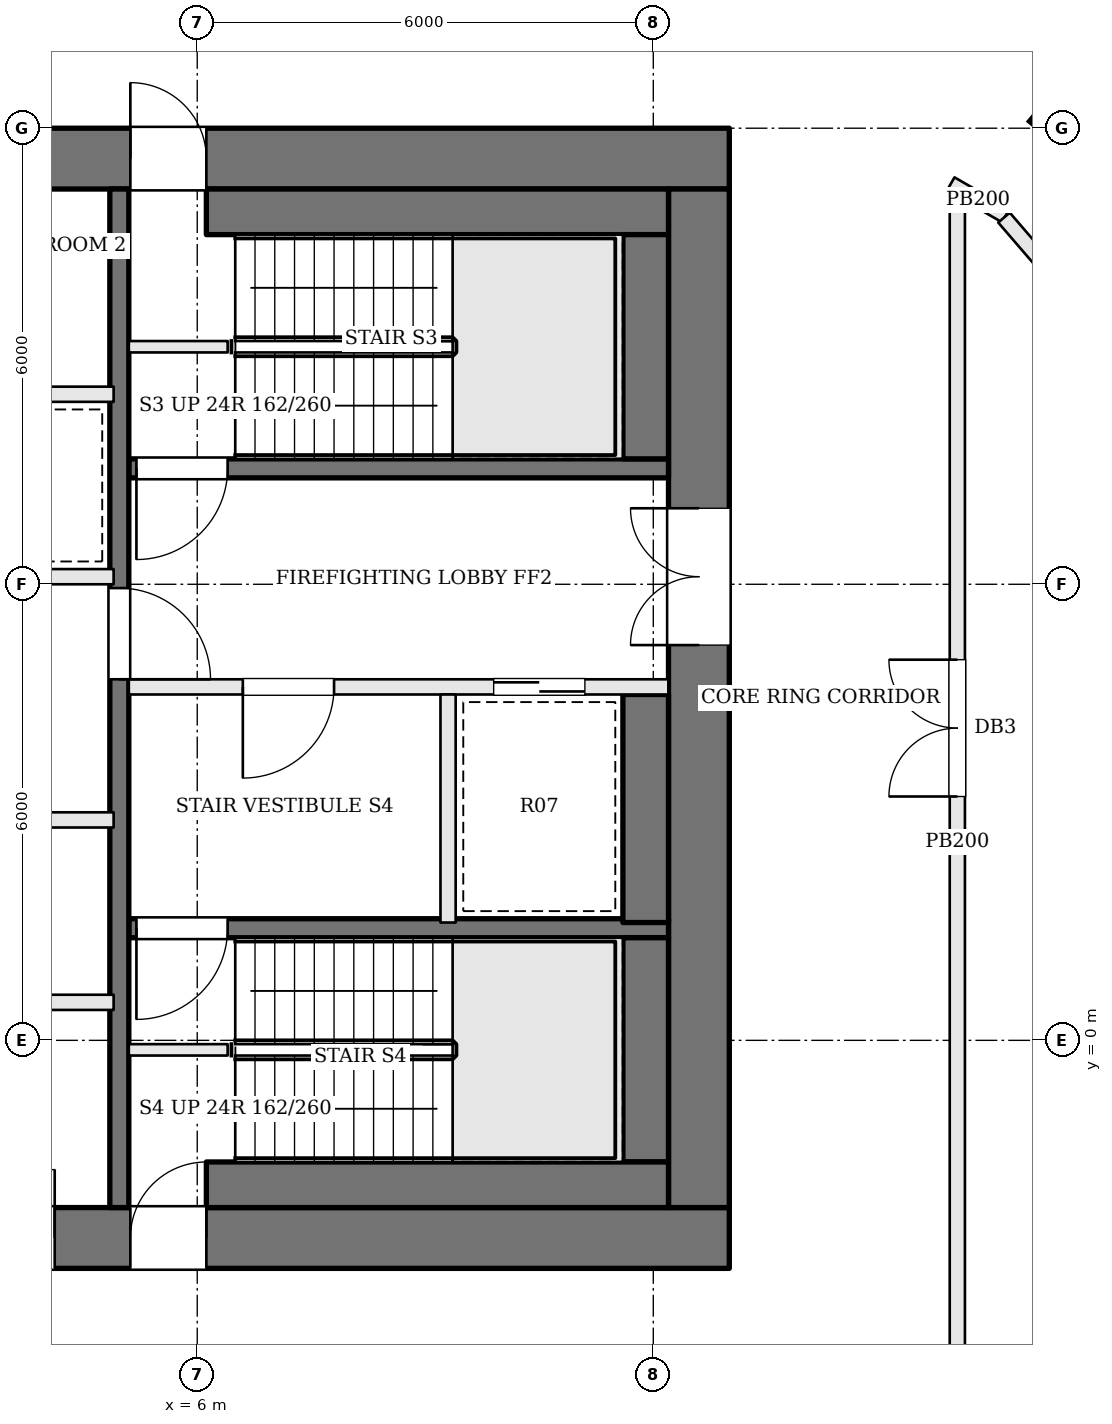
"""IFC4 building model, lengths in metres.
Left out: names, types, materials, properties, quantities, classifications, styles, units other than length and angle.
Written with IfcOpenShell. Run it as: python <this file> out.ifc"""

import sys

from ifc_helpers import new_model, si_unit, direction, frame, frame_2d, origin, origin_2d, place, context, subcontext, project, spatial, rectangle, extrude, element, fill, save


model = new_model("IFC4")
c1 = context("Model", 3, precision=1e-05, world=origin(), true_north=direction((0.0, 1.0)))
c2 = subcontext(c1, "Body", "Model", "MODEL_VIEW")
j1 = project(units=[si_unit("LENGTHUNIT", "METRE"), si_unit("PLANEANGLEUNIT", "RADIAN")], contexts=[c1])
p1 = place(None, origin())
s1 = spatial("IfcSite", under=j1, at=p1, CompositionType="ELEMENT")
p2 = place(p1, origin())
s2 = spatial("IfcBuilding", under=s1, at=p2, CompositionType="ELEMENT")
p3 = place(p2, frame((0.0, 0.0, 280.5)))
s3 = spatial("IfcBuildingStorey", under=s2, at=p3, CompositionType="ELEMENT", Elevation=280.5)
p4 = place(p3, frame((-13.0, 11.6, 0.0), z_axis=(0.0, 0.0, 1.0), x_axis=(1.0, 0.0, 0.0)))
e1 = element("IfcWall", 1, at=p4, inside=s3, PredefinedType="SHEAR", context=c2, shape_type="SweptSolid", body=[
    extrude(rectangle(XDim=26.0, YDim=0.8, at=frame_2d((13.0, 0.0))), origin(), (0.0, 0.0, 1.0), 3.9),
])
p5 = place(p4, frame((8.575, 0.0, 0.0)))
e2 = element("IfcOpeningElement", 2, at=p5, cuts=e1, PredefinedType="OPENING", context=c2, shape_type="SweptSolid", body=[
    extrude(rectangle(XDim=0.7, YDim=2.1, at=frame_2d((0.35, 1.05))), frame((0.0, 0.41, 0.0), z_axis=(0.0, -1.0, 0.0), x_axis=(1.0, 0.0, 0.0)), (0.0, 0.0, 1.0), 0.82),
])
p6 = place(p4, frame((10.875, 0.0, 0.0)))
e3 = element("IfcOpeningElement", 3, at=p6, cuts=e1, PredefinedType="OPENING", context=c2, shape_type="SweptSolid", body=[
    extrude(rectangle(XDim=1.0, YDim=2.1, at=frame_2d((0.5, 1.05))), frame((0.0, 0.41, 0.0), z_axis=(0.0, -1.0, 0.0), x_axis=(1.0, 0.0, 0.0)), (0.0, 0.0, 1.0), 0.82),
])
p7 = place(p4, frame((13.875, 0.0, 0.0)))
e4 = element("IfcOpeningElement", 4, at=p7, cuts=e1, PredefinedType="OPENING", context=c2, shape_type="SweptSolid", body=[
    extrude(rectangle(XDim=0.7, YDim=2.1, at=frame_2d((0.35, 1.05))), frame((0.0, 0.41, 0.0), z_axis=(0.0, -1.0, 0.0), x_axis=(1.0, 0.0, 0.0)), (0.0, 0.0, 1.0), 0.82),
])
p8 = place(p4, frame((16.325, 0.0, 0.0)))
e5 = element("IfcOpeningElement", 5, at=p8, cuts=e1, PredefinedType="OPENING", context=c2, shape_type="SweptSolid", body=[
    extrude(rectangle(XDim=0.7, YDim=2.1, at=frame_2d((0.35, 1.05))), frame((0.0, 0.41, 0.0), z_axis=(0.0, -1.0, 0.0), x_axis=(1.0, 0.0, 0.0)), (0.0, 0.0, 1.0), 0.82),
])
p9 = place(p4, frame((6.88, 0.0, 0.0)))
e6 = element("IfcOpeningElement", 6, at=p9, cuts=e1, PredefinedType="OPENING", context=c2, shape_type="SweptSolid", body=[
    extrude(rectangle(XDim=1.0, YDim=2.1, at=frame_2d((0.5, 1.05))), frame((0.0, 0.41, 0.0), z_axis=(0.0, -1.0, 0.0), x_axis=(1.0, 0.0, 0.0)), (0.0, 0.0, 1.0), 0.82),
])
p10 = place(p4, frame((18.12, 0.0, 0.0)))
e7 = element("IfcOpeningElement", 7, at=p10, cuts=e1, PredefinedType="OPENING", context=c2, shape_type="SweptSolid", body=[
    extrude(rectangle(XDim=1.0, YDim=2.1, at=frame_2d((0.5, 1.05))), frame((0.0, 0.41, 0.0), z_axis=(0.0, -1.0, 0.0), x_axis=(1.0, 0.0, 0.0)), (0.0, 0.0, 1.0), 0.82),
])
p11 = place(p3, frame((-13.0, -2.6, 0.0), z_axis=(0.0, 0.0, 1.0), x_axis=(1.0, 0.0, 0.0)))
e8 = element("IfcWall", 8, at=p11, inside=s3, PredefinedType="SHEAR", context=c2, shape_type="SweptSolid", body=[
    extrude(rectangle(XDim=26.0, YDim=0.8, at=frame_2d((13.0, 0.0))), origin(), (0.0, 0.0, 1.0), 3.9),
])
p12 = place(p11, frame((8.975, 0.0, 0.0)))
e9 = element("IfcOpeningElement", 9, at=p12, cuts=e8, PredefinedType="OPENING", context=c2, shape_type="SweptSolid", body=[
    extrude(rectangle(XDim=0.7, YDim=2.1, at=frame_2d((0.35, 1.05))), frame((0.0, 0.41, 0.0), z_axis=(0.0, -1.0, 0.0), x_axis=(1.0, 0.0, 0.0)), (0.0, 0.0, 1.0), 0.82),
])
p13 = place(p11, frame((11.675, 0.0, 0.0)))
e10 = element("IfcOpeningElement", 10, at=p13, cuts=e8, PredefinedType="OPENING", context=c2, shape_type="SweptSolid", body=[
    extrude(rectangle(XDim=1.0, YDim=2.1, at=frame_2d((0.5, 1.05))), frame((0.0, 0.41, 0.0), z_axis=(0.0, -1.0, 0.0), x_axis=(1.0, 0.0, 0.0)), (0.0, 0.0, 1.0), 0.82),
])
p14 = place(p11, frame((14.275, 0.0, 0.0)))
e11 = element("IfcOpeningElement", 11, at=p14, cuts=e8, PredefinedType="OPENING", context=c2, shape_type="SweptSolid", body=[
    extrude(rectangle(XDim=0.7, YDim=2.1, at=frame_2d((0.35, 1.05))), frame((0.0, 0.41, 0.0), z_axis=(0.0, -1.0, 0.0), x_axis=(1.0, 0.0, 0.0)), (0.0, 0.0, 1.0), 0.82),
])
p15 = place(p11, frame((16.225, 0.0, 0.0)))
e12 = element("IfcOpeningElement", 12, at=p15, cuts=e8, PredefinedType="OPENING", context=c2, shape_type="SweptSolid", body=[
    extrude(rectangle(XDim=0.9, YDim=2.1, at=frame_2d((0.45, 1.05))), frame((0.0, 0.41, 0.0), z_axis=(0.0, -1.0, 0.0), x_axis=(1.0, 0.0, 0.0)), (0.0, 0.0, 1.0), 0.82),
])
p16 = place(p11, frame((6.88, 0.0, 0.0)))
e13 = element("IfcOpeningElement", 13, at=p16, cuts=e8, PredefinedType="OPENING", context=c2, shape_type="SweptSolid", body=[
    extrude(rectangle(XDim=1.0, YDim=2.1, at=frame_2d((0.5, 1.05))), frame((0.0, 0.41, 0.0), z_axis=(0.0, -1.0, 0.0), x_axis=(1.0, 0.0, 0.0)), (0.0, 0.0, 1.0), 0.82),
])
p17 = place(p11, frame((18.12, 0.0, 0.0)))
e14 = element("IfcOpeningElement", 14, at=p17, cuts=e8, PredefinedType="OPENING", context=c2, shape_type="SweptSolid", body=[
    extrude(rectangle(XDim=1.0, YDim=2.1, at=frame_2d((0.5, 1.05))), frame((0.0, 0.41, 0.0), z_axis=(0.0, -1.0, 0.0), x_axis=(1.0, 0.0, 0.0)), (0.0, 0.0, 1.0), 0.82),
])
p18 = place(p3, frame((12.6, -2.2, 0.0), z_axis=(0.0, 0.0, 1.0), x_axis=(0.0, 1.0, 0.0)))
e15 = element("IfcWall", 15, at=p18, inside=s3, PredefinedType="SHEAR", context=c2, shape_type="SweptSolid", body=[
    extrude(rectangle(XDim=13.4, YDim=0.8, at=frame_2d((6.7, 0.0))), origin(), (0.0, 0.0, 1.0), 3.9),
])
p19 = place(p18, frame((7.4, 0.0, 0.0)))
e16 = element("IfcOpeningElement", 16, at=p19, cuts=e15, PredefinedType="OPENING", context=c2, shape_type="SweptSolid", body=[
    extrude(rectangle(XDim=1.8, YDim=2.1, at=frame_2d((0.9, 1.05))), frame((0.0, 0.41, 0.0), z_axis=(0.0, -1.0, 0.0), x_axis=(1.0, 0.0, 0.0)), (0.0, 0.0, 1.0), 0.82),
])
p20 = place(p3, frame((17.584, 12.151, 0.0), z_axis=(0.0, 0.0, 1.0), x_axis=(-0.770679191336, 0.637223339216, 0.0)))
e17 = element("IfcColumn", 17, at=p20, inside=s3, PredefinedType="COLUMN", context=c2, shape_type="SweptSolid", body=[
    extrude(rectangle(XDim=0.9, YDim=0.9, at=origin_2d()), origin(), (0.0, 0.0, 1.0), 3.9),
])
for number, where, z_axis, x_axis in (
    (18, (6.4, 9.125, 0.0), (0.0, 0.0, 1.0), (-1.0, 0.0, 0.0)),
    (19, (6.4, -0.125, 0.0), (0.0, 0.0, 1.0), (-1.0, 0.0, 0.0)),
):
    element("IfcWall", number, at=place(p3, frame(where, z_axis=z_axis, x_axis=x_axis)), inside=s3, PredefinedType="SOLIDWALL", context=c2, shape_type="SweptSolid", body=[
        extrude(rectangle(XDim=1.3, YDim=0.15, at=frame_2d((0.65, 0.0))), origin(), (0.0, 0.0, 1.0), 3.7),
    ])
p21 = place(p3, frame((12.2, 7.525, 0.0), z_axis=(0.0, 0.0, 1.0), x_axis=(-1.0, 0.0, 0.0)))
e20 = element("IfcWall", 20, at=p21, inside=s3, PredefinedType="SOLIDWALL", context=c2, shape_type="SweptSolid", body=[
    extrude(rectangle(XDim=7.1, YDim=0.25, at=frame_2d((3.55, 0.0))), origin(), (0.0, 0.0, 1.0), 3.7),
])
p22 = place(p21, frame((5.8, 0.0, 0.0)))
e21 = element("IfcOpeningElement", 21, at=p22, cuts=e20, PredefinedType="OPENING", context=c2, shape_type="SweptSolid", body=[
    extrude(rectangle(XDim=1.2, YDim=2.1, at=frame_2d((0.6, 1.05))), frame((0.0, 0.135, 0.0), z_axis=(0.0, -1.0, 0.0), x_axis=(1.0, 0.0, 0.0)), (0.0, 0.0, 1.0), 0.27),
])
p23 = place(p3, frame((12.2, 4.65, 0.0), z_axis=(0.0, 0.0, 1.0), x_axis=(-1.0, 0.0, 0.0)))
e22 = element("IfcWall", 22, at=p23, inside=s3, PredefinedType="SOLIDWALL", context=c2, shape_type="SweptSolid", body=[
    extrude(rectangle(XDim=7.1, YDim=0.2, at=frame_2d((3.55, 0.0))), origin(), (0.0, 0.0, 1.0), 3.7),
])
p24 = place(p23, frame((4.4, 0.0, 0.0)))
e23 = element("IfcOpeningElement", 23, at=p24, cuts=e22, PredefinedType="OPENING", context=c2, shape_type="SweptSolid", body=[
    extrude(rectangle(XDim=1.2, YDim=2.1, at=frame_2d((0.6, 1.05))), frame((0.0, 0.11, 0.0), z_axis=(0.0, -1.0, 0.0), x_axis=(1.0, 0.0, 0.0)), (0.0, 0.0, 1.0), 0.22),
])
p25 = place(p23, frame((1.1, 0.0, 0.0)))
e24 = element("IfcOpeningElement", 24, at=p25, cuts=e22, PredefinedType="OPENING", context=c2, shape_type="SweptSolid", body=[
    extrude(rectangle(XDim=1.2, YDim=2.1, at=frame_2d((0.6, 1.05))), frame((0.0, 0.11, 0.0), z_axis=(0.0, -1.0, 0.0), x_axis=(1.0, 0.0, 0.0)), (0.0, 0.0, 1.0), 0.22),
])
p26 = place(p3, frame((12.2, 1.475, 0.0), z_axis=(0.0, 0.0, 1.0), x_axis=(-1.0, 0.0, 0.0)))
e25 = element("IfcWall", 25, at=p26, inside=s3, PredefinedType="SOLIDWALL", context=c2, shape_type="SweptSolid", body=[
    extrude(rectangle(XDim=7.1, YDim=0.25, at=frame_2d((3.55, 0.0))), origin(), (0.0, 0.0, 1.0), 3.7),
])
p27 = place(p26, frame((5.8, 0.0, 0.0)))
e26 = element("IfcOpeningElement", 26, at=p27, cuts=e25, PredefinedType="OPENING", context=c2, shape_type="SweptSolid", body=[
    extrude(rectangle(XDim=1.2, YDim=2.1, at=frame_2d((0.6, 1.05))), frame((0.0, 0.135, 0.0), z_axis=(0.0, -1.0, 0.0), x_axis=(1.0, 0.0, 0.0)), (0.0, 0.0, 1.0), 0.27),
])
p28 = place(p3, frame((9.3, 4.55, 0.0), z_axis=(0.0, 0.0, 1.0), x_axis=(0.0, -1.0, 0.0)))
e27 = element("IfcWall", 27, at=p28, inside=s3, PredefinedType="SOLIDWALL", context=c2, shape_type="SweptSolid", body=[
    extrude(rectangle(XDim=3.0, YDim=0.2, at=frame_2d((1.5, 0.0))), origin(), (0.0, 0.0, 1.0), 3.7),
])
p29 = place(p3, frame((4.975, 11.2, 0.0), z_axis=(0.0, 0.0, 1.0), x_axis=(0.0, -1.0, 0.0)))
e28 = element("IfcWall", 28, at=p29, inside=s3, PredefinedType="SOLIDWALL", context=c2, shape_type="SweptSolid", body=[
    extrude(rectangle(XDim=13.4, YDim=0.25, at=frame_2d((6.7, 0.0))), origin(), (0.0, 0.0, 1.0), 3.7),
])
p30 = place(p29, frame((5.25, 0.0, 0.0)))
e29 = element("IfcOpeningElement", 29, at=p30, cuts=e28, PredefinedType="OPENING", context=c2, shape_type="SweptSolid", body=[
    extrude(rectangle(XDim=1.2, YDim=2.1, at=frame_2d((0.6, 1.05))), frame((0.0, 0.135, 0.0), z_axis=(0.0, -1.0, 0.0), x_axis=(1.0, 0.0, 0.0)), (0.0, 0.0, 1.0), 0.27),
])
p31 = place(p3, frame((12.2, 10.9, 0.0), z_axis=(0.0, 0.0, 1.0), x_axis=(-1.0, 0.0, 0.0)))
e30 = element("IfcWall", 30, at=p31, inside=s3, PredefinedType="SOLIDWALL", context=c2, shape_type="SweptSolid", body=[
    extrude(rectangle(XDim=6.08, YDim=0.6, at=frame_2d((3.04, 0.0))), origin(), (0.0, 0.0, 1.0), 3.7),
])
p32 = place(p3, frame((11.9, 10.6, 0.0), z_axis=(0.0, 0.0, 1.0), x_axis=(0.0, -1.0, 0.0)))
e31 = element("IfcWall", 31, at=p32, inside=s3, PredefinedType="SOLIDWALL", context=c2, shape_type="SweptSolid", body=[
    extrude(rectangle(XDim=2.95, YDim=0.6, at=frame_2d((1.475, 0.0))), origin(), (0.0, 0.0, 1.0), 3.7),
])
p33 = place(p3, frame((11.9, 4.55, 0.0), z_axis=(0.0, 0.0, 1.0), x_axis=(0.0, -1.0, 0.0)))
e32 = element("IfcWall", 32, at=p33, inside=s3, PredefinedType="SOLIDWALL", context=c2, shape_type="SweptSolid", body=[
    extrude(rectangle(XDim=3.0, YDim=0.6, at=frame_2d((1.5, 0.0))), origin(), (0.0, 0.0, 1.0), 3.7),
])
p34 = place(p3, frame((11.9, 1.35, 0.0), z_axis=(0.0, 0.0, 1.0), x_axis=(0.0, -1.0, 0.0)))
e33 = element("IfcWall", 33, at=p34, inside=s3, PredefinedType="SOLIDWALL", context=c2, shape_type="SweptSolid", body=[
    extrude(rectangle(XDim=2.95, YDim=0.6, at=frame_2d((1.475, 0.0))), origin(), (0.0, 0.0, 1.0), 3.7),
])
p35 = place(p3, frame((12.2, -1.9, 0.0), z_axis=(0.0, 0.0, 1.0), x_axis=(-1.0, 0.0, 0.0)))
e34 = element("IfcWall", 34, at=p35, inside=s3, PredefinedType="SOLIDWALL", context=c2, shape_type="SweptSolid", body=[
    extrude(rectangle(XDim=6.08, YDim=0.6, at=frame_2d((3.04, 0.0))), origin(), (0.0, 0.0, 1.0), 3.7),
])
p36 = place(p3, frame((-4.9, 0.5, 0.0), z_axis=(0.0, 0.0, 1.0), x_axis=(1.0, 0.0, 0.0)))
e35 = element("IfcWall", 35, at=p36, inside=s3, PredefinedType="SOLIDWALL", context=c2, shape_type="SweptSolid", body=[
    extrude(rectangle(XDim=9.8, YDim=0.2, at=frame_2d((4.9, 0.0))), origin(), (0.0, 0.0, 1.0), 3.7),
])
p37 = place(p3, frame((-4.9, 2.9, 0.0), z_axis=(0.0, 0.0, 1.0), x_axis=(1.0, 0.0, 0.0)))
e36 = element("IfcWall", 36, at=p37, inside=s3, PredefinedType="SOLIDWALL", context=c2, shape_type="SweptSolid", body=[
    extrude(rectangle(XDim=9.8, YDim=0.2, at=frame_2d((4.9, 0.0))), origin(), (0.0, 0.0, 1.0), 3.7),
])
p38 = place(p37, frame((2.613, 0.0, 0.0)))
e37 = element("IfcOpeningElement", 37, at=p38, cuts=e36, PredefinedType="OPENING", context=c2, shape_type="SweptSolid", body=[
    extrude(rectangle(XDim=0.9, YDim=2.1, at=frame_2d((0.45, 1.05))), frame((0.0, 0.11, 0.0), z_axis=(0.0, -1.0, 0.0), x_axis=(1.0, 0.0, 0.0)), (0.0, 0.0, 1.0), 0.22),
])
p39 = place(p37, frame((7.463, 0.0, 0.0)))
e38 = element("IfcOpeningElement", 38, at=p39, cuts=e36, PredefinedType="OPENING", context=c2, shape_type="SweptSolid", body=[
    extrude(rectangle(XDim=1.0, YDim=2.1, at=frame_2d((0.5, 1.05))), frame((0.0, 0.11, 0.0), z_axis=(0.0, -1.0, 0.0), x_axis=(1.0, 0.0, 0.0)), (0.0, 0.0, 1.0), 0.22),
])
for number, where, z_axis, x_axis in (
    (39, (-4.9, 6.1, 0.0), (0.0, 0.0, 1.0), (1.0, 0.0, 0.0)),
    (40, (-4.9, 8.5, 0.0), (0.0, 0.0, 1.0), (1.0, 0.0, 0.0)),
):
    element("IfcWall", number, at=place(p3, frame(where, z_axis=z_axis, x_axis=x_axis)), inside=s3, PredefinedType="SOLIDWALL", context=c2, shape_type="SweptSolid", body=[
        extrude(rectangle(XDim=9.8, YDim=0.2, at=frame_2d((4.9, 0.0))), origin(), (0.0, 0.0, 1.0), 3.7),
    ])
p40 = place(p3, frame((15.913, 11.267, 0.0), z_axis=(0.0, 0.0, 1.0), x_axis=(0.866219676164, -0.4996633593, 0.0)))
e41 = element("IfcWall", 41, at=p40, inside=s3, PredefinedType="PARTITIONING", context=c2, shape_type="SweptSolid", body=[
    extrude(rectangle(XDim=0.834, YDim=0.2, at=frame_2d((0.417, 0.0))), origin(), (0.0, 0.0, 1.0), 3.7),
])
p41 = place(p3, frame((16.614, 10.824, 0.0), z_axis=(0.0, 0.0, 1.0), x_axis=(0.652570543166, -0.757727976382, 0.0)))
e42 = element("IfcWall", 42, at=p41, inside=s3, PredefinedType="PARTITIONING", context=c2, shape_type="SweptSolid", body=[
    extrude(rectangle(XDim=4.764, YDim=0.2, at=frame_2d((2.382, 0.0))), origin(), (0.0, 0.0, 1.0), 3.7),
])
p42 = place(p3, frame((16.0, -5.9, 0.0), z_axis=(0.0, 0.0, 1.0), x_axis=(0.0, 1.0, 0.0)))
e43 = element("IfcWall", 43, at=p42, inside=s3, PredefinedType="PARTITIONING", context=c2, shape_type="SweptSolid", body=[
    extrude(rectangle(XDim=17.017, YDim=0.2, at=frame_2d((8.508, 0.0))), origin(), (0.0, 0.0, 1.0), 3.7),
])
p43 = place(p42, frame((9.108, 0.0, 0.0)))
e44 = element("IfcOpeningElement", 44, at=p43, cuts=e43, PredefinedType="OPENING", context=c2, shape_type="SweptSolid", body=[
    extrude(rectangle(XDim=1.8, YDim=2.1, at=frame_2d((0.9, 1.05))), frame((0.0, 0.11, 0.0), z_axis=(0.0, -1.0, 0.0), x_axis=(1.0, 0.0, 0.0)), (0.0, 0.0, 1.0), 0.22),
])
p44 = place(p19, origin())
e45 = element("IfcDoor", 45, at=p44, inside=s3, OperationType="DOUBLE_DOOR_SINGLE_SWING", PredefinedType="DOOR", context=c2, shape_type="SweptSolid", body=[
    extrude(rectangle(XDim=1.8, YDim=2.1, at=frame_2d((0.9, 1.05))), frame((0.0, 0.025, 0.0), z_axis=(0.0, -1.0, 0.0), x_axis=(1.0, 0.0, 0.0)), (0.0, 0.0, 1.0), 0.05),
])
fill(e16, e45)
p45 = place(p30, origin())
e46 = element("IfcDoor", 46, at=p45, inside=s3, OperationType="SINGLE_SWING_RIGHT", PredefinedType="DOOR", context=c2, shape_type="SweptSolid", body=[
    extrude(rectangle(XDim=1.2, YDim=2.1, at=frame_2d((0.6, 1.05))), frame((0.0, 0.025, 0.0), z_axis=(0.0, -1.0, 0.0), x_axis=(1.0, 0.0, 0.0)), (0.0, 0.0, 1.0), 0.05),
])
fill(e29, e46)
p46 = place(p24, origin())
e47 = element("IfcDoor", 47, at=p46, inside=s3, OperationType="SINGLE_SWING_RIGHT", PredefinedType="DOOR", context=c2, shape_type="SweptSolid", body=[
    extrude(rectangle(XDim=1.2, YDim=2.1, at=frame_2d((0.6, 1.05))), frame((0.0, 0.025, 0.0), z_axis=(0.0, -1.0, 0.0), x_axis=(1.0, 0.0, 0.0)), (0.0, 0.0, 1.0), 0.05),
])
fill(e23, e47)
p47 = place(p22, origin())
e48 = element("IfcDoor", 48, at=p47, inside=s3, OperationType="SINGLE_SWING_RIGHT", PredefinedType="DOOR", context=c2, shape_type="SweptSolid", body=[
    extrude(rectangle(XDim=1.2, YDim=2.1, at=frame_2d((0.6, 1.05))), frame((0.0, 0.025, 0.0), z_axis=(0.0, -1.0, 0.0), x_axis=(1.0, 0.0, 0.0)), (0.0, 0.0, 1.0), 0.05),
])
fill(e21, e48)
p48 = place(p27, origin())
e49 = element("IfcDoor", 49, at=p48, inside=s3, OperationType="SINGLE_SWING_RIGHT", PredefinedType="DOOR", context=c2, shape_type="SweptSolid", body=[
    extrude(rectangle(XDim=1.2, YDim=2.1, at=frame_2d((0.6, 1.05))), frame((0.0, 0.025, 0.0), z_axis=(0.0, -1.0, 0.0), x_axis=(1.0, 0.0, 0.0)), (0.0, 0.0, 1.0), 0.05),
])
fill(e26, e49)
p49 = place(p25, origin())
e50 = element("IfcDoor", 50, at=p49, inside=s3, OperationType="SLIDING_TO_RIGHT", PredefinedType="DOOR", context=c2, shape_type="SweptSolid", body=[
    extrude(rectangle(XDim=1.2, YDim=2.1, at=frame_2d((0.6, 1.05))), frame((0.0, 0.025, 0.0), z_axis=(0.0, -1.0, 0.0), x_axis=(1.0, 0.0, 0.0)), (0.0, 0.0, 1.0), 0.05),
])
fill(e24, e50)
p50 = place(p15, origin())
e51 = element("IfcDoor", 51, at=p50, inside=s3, OperationType="SINGLE_SWING_RIGHT", PredefinedType="DOOR", context=c2, shape_type="SweptSolid", body=[
    extrude(rectangle(XDim=0.9, YDim=2.1, at=frame_2d((0.45, 1.05))), frame((0.0, 0.025, 0.0), z_axis=(0.0, -1.0, 0.0), x_axis=(1.0, 0.0, 0.0)), (0.0, 0.0, 1.0), 0.05),
])
fill(e12, e51)
p51 = place(p10, origin())
e52 = element("IfcDoor", 52, at=p51, inside=s3, OperationType="SINGLE_SWING_LEFT", PredefinedType="DOOR", context=c2, shape_type="SweptSolid", body=[
    extrude(rectangle(XDim=1.0, YDim=2.1, at=frame_2d((0.5, 1.05))), frame((0.0, 0.025, 0.0), z_axis=(0.0, -1.0, 0.0), x_axis=(1.0, 0.0, 0.0)), (0.0, 0.0, 1.0), 0.05),
])
fill(e7, e52)
p52 = place(p17, origin())
e53 = element("IfcDoor", 53, at=p52, inside=s3, OperationType="SINGLE_SWING_RIGHT", PredefinedType="DOOR", context=c2, shape_type="SweptSolid", body=[
    extrude(rectangle(XDim=1.0, YDim=2.1, at=frame_2d((0.5, 1.05))), frame((0.0, 0.025, 0.0), z_axis=(0.0, -1.0, 0.0), x_axis=(1.0, 0.0, 0.0)), (0.0, 0.0, 1.0), 0.05),
])
fill(e14, e53)
p53 = place(p43, origin())
e54 = element("IfcDoor", 54, at=p53, inside=s3, OperationType="DOUBLE_DOOR_SINGLE_SWING", PredefinedType="DOOR", context=c2, shape_type="SweptSolid", body=[
    extrude(rectangle(XDim=1.8, YDim=2.1, at=frame_2d((0.9, 1.05))), frame((0.0, 0.025, 0.0), z_axis=(0.0, -1.0, 0.0), x_axis=(1.0, 0.0, 0.0)), (0.0, 0.0, 1.0), 0.05),
])
fill(e44, e54)
save(model, sys.argv[1])
